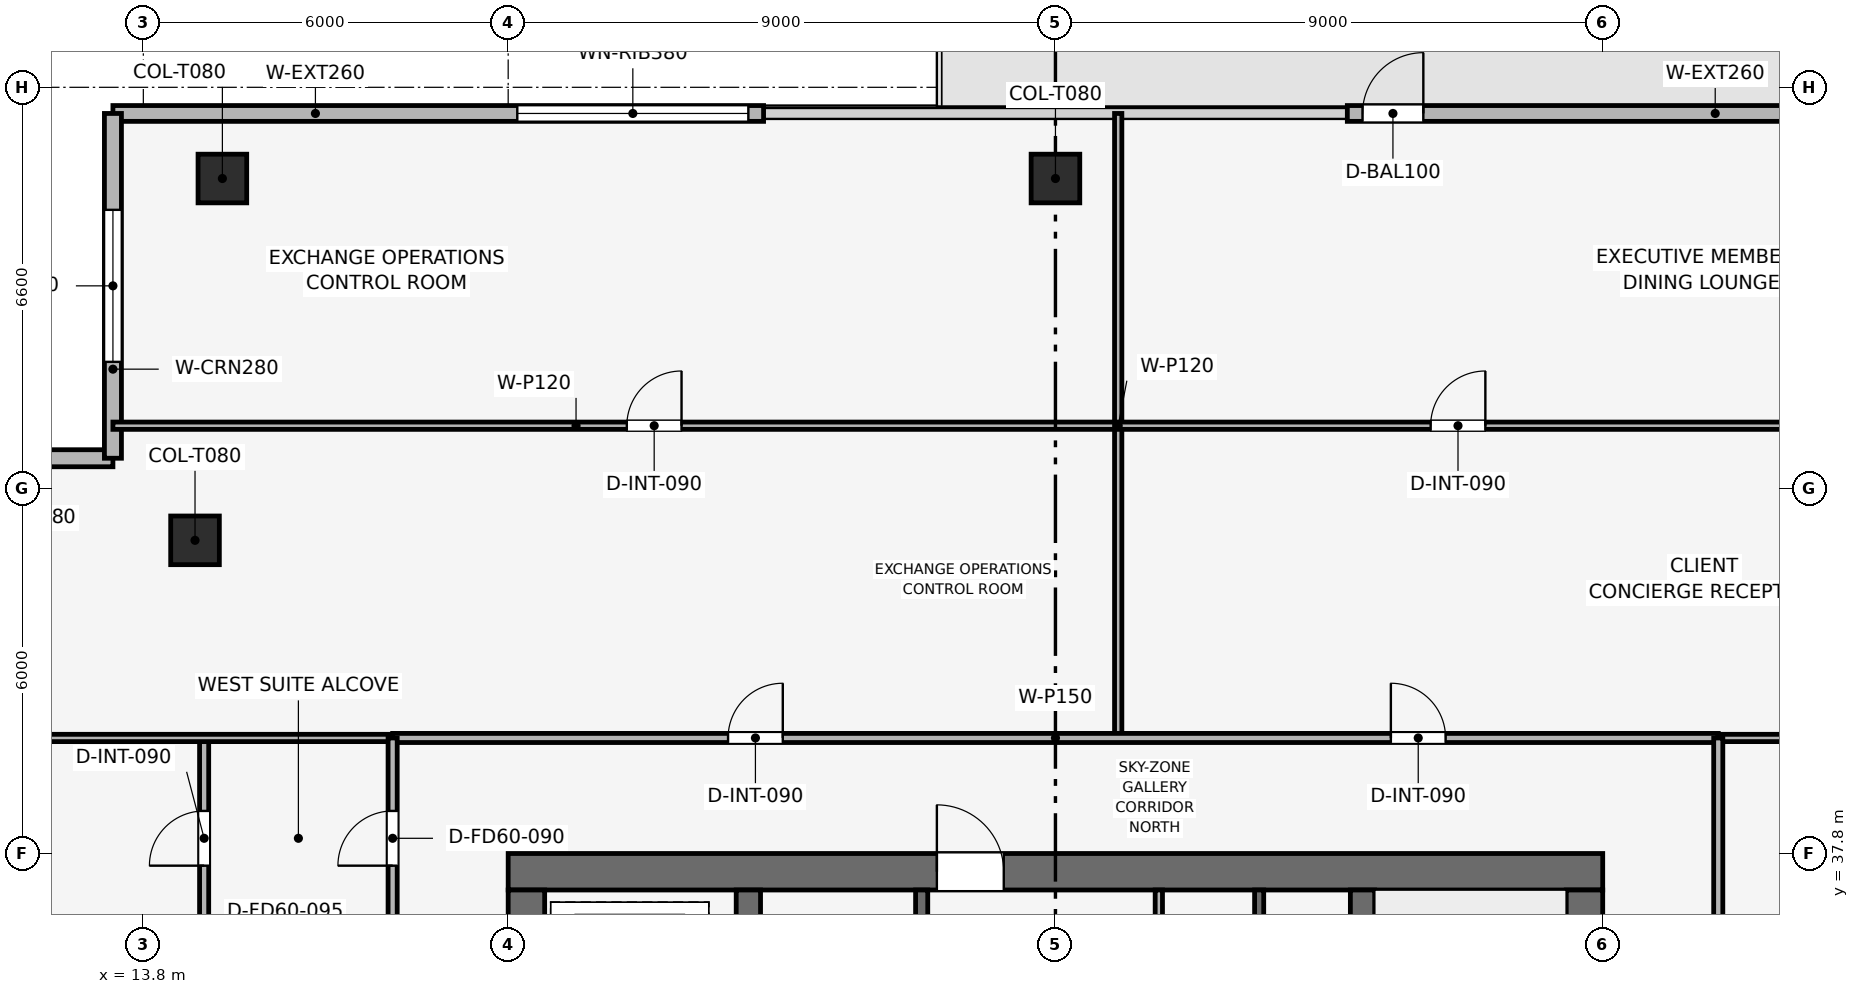
"""IFC4 building model, lengths in metres.
Left out: names, types, materials, properties, quantities, classifications, styles, units other than length and angle.
Written with IfcOpenShell. Run it as: python <this file> out.ifc"""

import sys

from ifc_helpers import new_model, si_unit, direction, frame, frame_2d, origin, origin_2d, place, context, subcontext, project, spatial, rectangle, extrude, element, fill, save


model = new_model("IFC4")
c1 = context("Model", 3, precision=1e-05, world=origin(), true_north=direction((0.0, 1.0)))
c2 = subcontext(c1, "Body", "Model", "MODEL_VIEW")
j1 = project(units=[si_unit("LENGTHUNIT", "METRE"), si_unit("PLANEANGLEUNIT", "RADIAN")], contexts=[c1])
p1 = place(None, origin())
s1 = spatial("IfcSite", under=j1, at=p1, CompositionType="ELEMENT")
p2 = place(p1, origin())
s2 = spatial("IfcBuilding", under=s1, at=p2, CompositionType="ELEMENT")
p3 = place(p2, frame((0.0, 0.0, 348.0)))
s3 = spatial("IfcBuildingStorey", under=s2, at=p3, CompositionType="ELEMENT", Elevation=348.0)
p4 = place(p3, frame((19.8, 37.5, 0.0), z_axis=(0.0, 0.0, 1.0), x_axis=(1.0, 0.0, 0.0)))
e1 = element("IfcWall", 1, at=p4, inside=s3, PredefinedType="SHEAR", context=c2, shape_type="SweptSolid", body=[
    extrude(rectangle(XDim=18.0, YDim=0.6, at=frame_2d((9.0, 0.0))), origin(), (0.0, 0.0, 1.0), 3.75),
])
p5 = place(p4, frame((7.05, 0.0, 0.0)))
e2 = element("IfcOpeningElement", 2, at=p5, cuts=e1, PredefinedType="OPENING", context=c2, shape_type="SweptSolid", body=[
    extrude(rectangle(XDim=1.1, YDim=2.15, at=frame_2d((0.55, 1.075))), frame((0.0, 0.31, 0.0), z_axis=(0.0, -1.0, 0.0), x_axis=(1.0, 0.0, 0.0)), (0.0, 0.0, 1.0), 0.62),
])
p6 = place(p3, frame((20.1, 20.4, 0.0), z_axis=(0.0, 0.0, 1.0), x_axis=(0.0, 1.0, 0.0)))
e3 = element("IfcWall", 3, at=p6, inside=s3, PredefinedType="SHEAR", context=c2, shape_type="SweptSolid", body=[
    extrude(rectangle(XDim=16.8, YDim=0.6, at=frame_2d((8.4, 0.0))), origin(), (0.0, 0.0, 1.0), 3.75),
])
p7 = place(p6, frame((10.4, 0.0, 0.0)))
e4 = element("IfcOpeningElement", 4, at=p7, cuts=e3, PredefinedType="OPENING", context=c2, shape_type="SweptSolid", body=[
    extrude(rectangle(XDim=1.1, YDim=2.15, at=frame_2d((0.55, 1.075))), frame((0.0, 0.31, 0.0), z_axis=(0.0, -1.0, 0.0), x_axis=(1.0, 0.0, 0.0)), (0.0, 0.0, 1.0), 0.62),
])
p8 = place(p3, frame((37.5, 20.4, 0.0), z_axis=(0.0, 0.0, 1.0), x_axis=(0.0, 1.0, 0.0)))
e5 = element("IfcWall", 5, at=p8, inside=s3, PredefinedType="SHEAR", context=c2, shape_type="SweptSolid", body=[
    extrude(rectangle(XDim=16.8, YDim=0.6, at=frame_2d((8.4, 0.0))), origin(), (0.0, 0.0, 1.0), 3.75),
])
p9 = place(p8, frame((4.9, 0.0, 0.0)))
e6 = element("IfcOpeningElement", 6, at=p9, cuts=e5, PredefinedType="OPENING", context=c2, shape_type="SweptSolid", body=[
    extrude(rectangle(XDim=1.1, YDim=2.15, at=frame_2d((0.55, 1.075))), frame((0.0, 0.31, 0.0), z_axis=(0.0, -1.0, 0.0), x_axis=(1.0, 0.0, 0.0)), (0.0, 0.0, 1.0), 0.62),
])
for number, where, z_axis, x_axis in (
    (7, (23.75, 20.4, 0.0), (0.0, 0.0, 1.0), (0.0, 1.0, 0.0)),
    (8, (33.85, 20.4, 0.0), (0.0, 0.0, 1.0), (0.0, 1.0, 0.0)),
):
    element("IfcWall", number, at=place(p3, frame(where, z_axis=z_axis, x_axis=x_axis)), inside=s3, PredefinedType="SHEAR", context=c2, shape_type="SweptSolid", body=[
        extrude(rectangle(XDim=16.8, YDim=0.4, at=frame_2d((8.4, 0.0))), origin(), (0.0, 0.0, 1.0), 3.75),
    ])
for number, where, z_axis, x_axis in (
    (9, (28.8, 48.9, 0.003), (0.0, 0.0, 1.0), (1.0, 0.0, 0.0)),
    (10, (15.1, 48.9, 0.003), (0.0, 0.0, 1.0), (1.0, 0.0, 0.0)),
    (11, (14.65, 42.95, 0.003), (0.0, 0.0, 1.0), (1.0, 0.0, 0.0)),
):
    element("IfcColumn", number, at=place(p3, frame(where, z_axis=z_axis, x_axis=x_axis)), inside=s3, PredefinedType="COLUMN", context=c2, shape_type="SweptSolid", body=[
        extrude(rectangle(XDim=0.8, YDim=0.8, at=origin_2d()), origin(), (0.0, 0.0, 1.0), 3.504),
    ])
p10 = place(p3, frame((13.3, 49.97, 0.0), z_axis=(0.0, 0.0, 1.0), x_axis=(1.0, 0.0, 0.0)))
e12 = element("IfcWall", 12, at=p10, inside=s3, PredefinedType="SOLIDWALL", context=c2, shape_type="SweptSolid", body=[
    extrude(rectangle(XDim=10.7, YDim=0.26, at=frame_2d((5.35, 0.0))), origin(), (0.0, 0.0, 1.0), 3.51),
])
p11 = place(p10, frame((6.65, 0.0, 0.9)))
e13 = element("IfcOpeningElement", 13, at=p11, cuts=e12, PredefinedType="OPENING", context=c2, shape_type="SweptSolid", body=[
    extrude(rectangle(XDim=3.8, YDim=1.9, at=frame_2d((1.9, 0.95))), frame((0.0, 0.14, 0.0), z_axis=(0.0, -1.0, 0.0), x_axis=(1.0, 0.0, 0.0)), (0.0, 0.0, 1.0), 0.28),
])
p12 = place(p3, frame((33.6, 49.97, 0.0), z_axis=(0.0, 0.0, 1.0), x_axis=(1.0, 0.0, 0.0)))
e14 = element("IfcWall", 14, at=p12, inside=s3, PredefinedType="SOLIDWALL", context=c2, shape_type="SweptSolid", body=[
    extrude(rectangle(XDim=10.7, YDim=0.26, at=frame_2d((5.35, 0.0))), origin(), (0.0, 0.0, 1.0), 3.51),
])
p13 = place(p12, frame((0.25, 0.0, 0.0)))
e15 = element("IfcOpeningElement", 15, at=p13, cuts=e14, PredefinedType="OPENING", context=c2, shape_type="SweptSolid", body=[
    extrude(rectangle(XDim=1.0, YDim=2.2, at=frame_2d((0.5, 1.1))), frame((0.0, 0.14, 0.0), z_axis=(0.0, -1.0, 0.0), x_axis=(1.0, 0.0, 0.0)), (0.0, 0.0, 1.0), 0.28),
])
p14 = place(p3, frame((7.63, 44.3, 0.0), z_axis=(0.0, 0.0, 1.0), x_axis=(1.0, 0.0, 0.0)))
e16 = element("IfcWall", 16, at=p14, inside=s3, PredefinedType="SOLIDWALL", context=c2, shape_type="SweptSolid", body=[
    extrude(rectangle(XDim=5.67, YDim=0.28, at=frame_2d((2.835, 0.0))), origin(), (0.0, 0.0, 1.0), 3.51),
])
p15 = place(p14, frame((1.585, 0.0, 0.9)))
e17 = element("IfcOpeningElement", 17, at=p15, cuts=e16, PredefinedType="OPENING", context=c2, shape_type="SweptSolid", body=[
    extrude(rectangle(XDim=2.5, YDim=1.9, at=frame_2d((1.25, 0.95))), frame((0.0, 0.15, 0.0), z_axis=(0.0, -1.0, 0.0), x_axis=(1.0, 0.0, 0.0)), (0.0, 0.0, 1.0), 0.3),
])
p16 = place(p3, frame((13.3, 44.3, 0.0), z_axis=(0.0, 0.0, 1.0), x_axis=(0.0, 1.0, 0.0)))
e18 = element("IfcWall", 18, at=p16, inside=s3, PredefinedType="SOLIDWALL", context=c2, shape_type="SweptSolid", body=[
    extrude(rectangle(XDim=5.67, YDim=0.28, at=frame_2d((2.835, 0.0))), origin(), (0.0, 0.0, 1.0), 3.51),
])
p17 = place(p16, frame((1.585, 0.0, 0.9)))
e19 = element("IfcOpeningElement", 19, at=p17, cuts=e18, PredefinedType="OPENING", context=c2, shape_type="SweptSolid", body=[
    extrude(rectangle(XDim=2.5, YDim=1.9, at=frame_2d((1.25, 0.95))), frame((0.0, 0.15, 0.0), z_axis=(0.0, -1.0, 0.0), x_axis=(1.0, 0.0, 0.0)), (0.0, 0.0, 1.0), 0.3),
])
p18 = place(p3, frame((32.15, 34.0, 0.0), z_axis=(0.0, 0.0, 1.0), x_axis=(0.0, 1.0, 0.0)))
e20 = element("IfcWall", 20, at=p18, inside=s3, PredefinedType="SHEAR", context=c2, shape_type="SweptSolid", body=[
    extrude(rectangle(XDim=3.2, YDim=0.15, at=frame_2d((1.6, 0.0))), origin(), (0.0, 0.0, 1.0), 3.51),
])
p19 = place(p3, frame((26.6, 34.0, 0.0), z_axis=(0.0, 0.0, 1.0), x_axis=(0.0, 1.0, 0.0)))
e21 = element("IfcWall", 21, at=p19, inside=s3, PredefinedType="SHEAR", context=c2, shape_type="SweptSolid", body=[
    extrude(rectangle(XDim=3.2, YDim=0.2, at=frame_2d((1.6, 0.0))), origin(), (0.0, 0.0, 1.0), 3.51),
])
p20 = place(p19, frame((0.75, 0.0, 0.0)))
e22 = element("IfcOpeningElement", 22, at=p20, cuts=e21, PredefinedType="OPENING", context=c2, shape_type="SweptSolid", body=[
    extrude(rectangle(XDim=1.1, YDim=2.15, at=frame_2d((0.55, 1.075))), frame((0.0, 0.11, 0.0), z_axis=(0.0, -1.0, 0.0), x_axis=(1.0, 0.0, 0.0)), (0.0, 0.0, 1.0), 0.22),
])
p21 = place(p3, frame((30.5, 33.925, 0.0), z_axis=(0.0, 0.0, 1.0), x_axis=(0.0, 1.0, 0.0)))
e23 = element("IfcWall", 23, at=p21, inside=s3, PredefinedType="PARTITIONING", context=c2, shape_type="SweptSolid", body=[
    extrude(rectangle(XDim=3.275, YDim=0.12, at=frame_2d((1.637, 0.0))), origin(), (0.0, 0.0, 1.0), 3.51),
])
p22 = place(p21, frame((0.85, 0.0, 0.0)))
e24 = element("IfcOpeningElement", 24, at=p22, cuts=e23, PredefinedType="OPENING", context=c2, shape_type="SweptSolid", body=[
    extrude(rectangle(XDim=0.9, YDim=2.1, at=frame_2d((0.45, 1.05))), frame((0.0, 0.07, 0.0), z_axis=(0.0, -1.0, 0.0), x_axis=(1.0, 0.0, 0.0)), (0.0, 0.0, 1.0), 0.14),
])
p23 = place(p3, frame((13.3, 44.835, 0.0), z_axis=(0.0, 0.0, 1.0), x_axis=(1.0, 0.0, 0.0)))
e25 = element("IfcWall", 25, at=p23, inside=s3, PredefinedType="PARTITIONING", context=c2, shape_type="SweptSolid", body=[
    extrude(rectangle(XDim=16.532, YDim=0.12, at=frame_2d((8.266, 0.0))), origin(), (0.0, 0.0, 1.0), 3.095),
])
p24 = place(p23, frame((8.451, 0.0, 0.0)))
e26 = element("IfcOpeningElement", 26, at=p24, cuts=e25, PredefinedType="OPENING", context=c2, shape_type="SweptSolid", body=[
    extrude(rectangle(XDim=0.9, YDim=2.1, at=frame_2d((0.45, 1.05))), frame((0.0, 0.07, 0.0), z_axis=(0.0, -1.0, 0.0), x_axis=(1.0, 0.0, 0.0)), (0.0, 0.0, 1.0), 0.14),
])
p25 = place(p3, frame((29.832, 39.7, 0.0), z_axis=(0.0, 0.0, 1.0), x_axis=(0.0, 1.0, 0.0)))
e27 = element("IfcWall", 27, at=p25, inside=s3, PredefinedType="PARTITIONING", context=c2, shape_type="SweptSolid", body=[
    extrude(rectangle(XDim=10.27, YDim=0.12, at=frame_2d((5.135, 0.0))), origin(), (0.0, 0.0, 1.0), 3.135),
])
p26 = place(p3, frame((29.832, 44.835, 0.0), z_axis=(0.0, 0.0, 1.0), x_axis=(1.0, 0.0, 0.0)))
e28 = element("IfcWall", 28, at=p26, inside=s3, PredefinedType="PARTITIONING", context=c2, shape_type="SweptSolid", body=[
    extrude(rectangle(XDim=14.468, YDim=0.12, at=frame_2d((7.234, 0.0))), origin(), (0.0, 0.0, 1.0), 3.095),
])
p27 = place(p26, frame((5.138, 0.0, 0.0)))
e29 = element("IfcOpeningElement", 29, at=p27, cuts=e28, PredefinedType="OPENING", context=c2, shape_type="SweptSolid", body=[
    extrude(rectangle(XDim=0.9, YDim=2.1, at=frame_2d((0.45, 1.05))), frame((0.0, 0.07, 0.0), z_axis=(0.0, -1.0, 0.0), x_axis=(1.0, 0.0, 0.0)), (0.0, 0.0, 1.0), 0.14),
])
p28 = place(p3, frame((14.8, 28.0, 0.0), z_axis=(0.0, 0.0, 1.0), x_axis=(0.0, 1.0, 0.0)))
e30 = element("IfcWall", 30, at=p28, inside=s3, PredefinedType="PARTITIONING", context=c2, shape_type="SweptSolid", body=[
    extrude(rectangle(XDim=11.7, YDim=0.15, at=frame_2d((5.85, 0.0))), origin(), (0.0, 0.0, 1.0), 3.095),
])
p29 = place(p28, frame((9.6, 0.0, 0.0)))
e31 = element("IfcOpeningElement", 31, at=p29, cuts=e30, PredefinedType="OPENING", context=c2, shape_type="SweptSolid", body=[
    extrude(rectangle(XDim=0.9, YDim=2.1, at=frame_2d((0.45, 1.05))), frame((0.0, 0.085, 0.0), z_axis=(0.0, -1.0, 0.0), x_axis=(1.0, 0.0, 0.0)), (0.0, 0.0, 1.0), 0.17),
])
for number, where, z_axis, x_axis in (
    (32, (7.63, 39.7, 0.0), (0.0, 0.0, 1.0), (1.0, 0.0, 0.0)),
    (33, (39.7, 39.7, 0.0), (0.0, 0.0, 1.0), (1.0, 0.0, 0.0)),
):
    element("IfcWall", number, at=place(p3, frame(where, z_axis=z_axis, x_axis=x_axis)), inside=s3, PredefinedType="PARTITIONING", context=c2, shape_type="SweptSolid", body=[
        extrude(rectangle(XDim=10.27, YDim=0.12, at=frame_2d((5.135, 0.0))), origin(), (0.0, 0.0, 1.0), 3.095),
    ])
p30 = place(p3, frame((17.9, 39.7, 0.0), z_axis=(0.0, 0.0, 1.0), x_axis=(1.0, 0.0, 0.0)))
e34 = element("IfcWall", 34, at=p30, inside=s3, PredefinedType="PARTITIONING", context=c2, shape_type="SweptSolid", body=[
    extrude(rectangle(XDim=21.8, YDim=0.15, at=frame_2d((10.9, 0.0))), origin(), (0.0, 0.0, 1.0), 3.095),
])
p31 = place(p30, frame((5.516, 0.0, 0.0)))
e35 = element("IfcOpeningElement", 35, at=p31, cuts=e34, PredefinedType="OPENING", context=c2, shape_type="SweptSolid", body=[
    extrude(rectangle(XDim=0.9, YDim=2.1, at=frame_2d((0.45, 1.05))), frame((0.0, 0.085, 0.0), z_axis=(0.0, -1.0, 0.0), x_axis=(1.0, 0.0, 0.0)), (0.0, 0.0, 1.0), 0.17),
])
p32 = place(p30, frame((16.416, 0.0, 0.0)))
e36 = element("IfcOpeningElement", 36, at=p32, cuts=e34, PredefinedType="OPENING", context=c2, shape_type="SweptSolid", body=[
    extrude(rectangle(XDim=0.9, YDim=2.1, at=frame_2d((0.45, 1.05))), frame((0.0, 0.085, 0.0), z_axis=(0.0, -1.0, 0.0), x_axis=(1.0, 0.0, 0.0)), (0.0, 0.0, 1.0), 0.17),
])
p33 = place(p3, frame((17.9, 13.3, 0.0), z_axis=(0.0, 0.0, 1.0), x_axis=(0.0, 1.0, 0.0)))
e37 = element("IfcWall", 37, at=p33, inside=s3, PredefinedType="PARTITIONING", context=c2, shape_type="SweptSolid", body=[
    extrude(rectangle(XDim=26.4, YDim=0.15, at=frame_2d((13.2, 0.0))), origin(), (0.0, 0.0, 1.0), 3.095),
])
p34 = place(p33, frame((6.9, 0.0, 0.0)))
e38 = element("IfcOpeningElement", 38, at=p34, cuts=e37, PredefinedType="OPENING", context=c2, shape_type="SweptSolid", body=[
    extrude(rectangle(XDim=0.9, YDim=2.1, at=frame_2d((0.45, 1.05))), frame((0.0, 0.085, 0.0), z_axis=(0.0, -1.0, 0.0), x_axis=(1.0, 0.0, 0.0)), (0.0, 0.0, 1.0), 0.17),
])
p35 = place(p33, frame((15.65, 0.0, 0.0)))
e39 = element("IfcOpeningElement", 39, at=p35, cuts=e37, PredefinedType="OPENING", context=c2, shape_type="SweptSolid", body=[
    extrude(rectangle(XDim=0.9, YDim=2.1, at=frame_2d((0.45, 1.05))), frame((0.0, 0.085, 0.0), z_axis=(0.0, -1.0, 0.0), x_axis=(1.0, 0.0, 0.0)), (0.0, 0.0, 1.0), 0.17),
])
p36 = place(p33, frame((18.55, 0.0, 0.0)))
e40 = element("IfcOpeningElement", 40, at=p36, cuts=e37, PredefinedType="OPENING", context=c2, shape_type="SweptSolid", body=[
    extrude(rectangle(XDim=0.9, YDim=2.1, at=frame_2d((0.45, 1.05))), frame((0.0, 0.085, 0.0), z_axis=(0.0, -1.0, 0.0), x_axis=(1.0, 0.0, 0.0)), (0.0, 0.0, 1.0), 0.17),
])
p37 = place(p33, frame((21.3, 0.0, 0.0)))
e41 = element("IfcOpeningElement", 41, at=p37, cuts=e37, PredefinedType="OPENING", context=c2, shape_type="SweptSolid", body=[
    extrude(rectangle(XDim=0.95, YDim=2.1, at=frame_2d((0.475, 1.05))), frame((0.0, 0.085, 0.0), z_axis=(0.0, -1.0, 0.0), x_axis=(1.0, 0.0, 0.0)), (0.0, 0.0, 1.0), 0.17),
])
p38 = place(p33, frame((24.3, 0.0, 0.0)))
e42 = element("IfcOpeningElement", 42, at=p38, cuts=e37, PredefinedType="OPENING", context=c2, shape_type="SweptSolid", body=[
    extrude(rectangle(XDim=0.9, YDim=2.1, at=frame_2d((0.45, 1.05))), frame((0.0, 0.085, 0.0), z_axis=(0.0, -1.0, 0.0), x_axis=(1.0, 0.0, 0.0)), (0.0, 0.0, 1.0), 0.17),
])
p39 = place(p3, frame((39.7, 24.4, 0.0), z_axis=(0.0, 0.0, 1.0), x_axis=(0.0, 1.0, 0.0)))
e43 = element("IfcWall", 43, at=p39, inside=s3, PredefinedType="PARTITIONING", context=c2, shape_type="SweptSolid", body=[
    extrude(rectangle(XDim=15.3, YDim=0.15, at=frame_2d((7.65, 0.0))), origin(), (0.0, 0.0, 1.0), 3.095),
])
p40 = place(p39, frame((0.7, 0.0, 0.0)))
e44 = element("IfcOpeningElement", 44, at=p40, cuts=e43, PredefinedType="OPENING", context=c2, shape_type="SweptSolid", body=[
    extrude(rectangle(XDim=0.9, YDim=2.1, at=frame_2d((0.45, 1.05))), frame((0.0, 0.085, 0.0), z_axis=(0.0, -1.0, 0.0), x_axis=(1.0, 0.0, 0.0)), (0.0, 0.0, 1.0), 0.17),
])
p41 = place(p39, frame((3.966, 0.0, 0.0)))
e45 = element("IfcOpeningElement", 45, at=p41, cuts=e43, PredefinedType="OPENING", context=c2, shape_type="SweptSolid", body=[
    extrude(rectangle(XDim=0.9, YDim=2.1, at=frame_2d((0.45, 1.05))), frame((0.0, 0.085, 0.0), z_axis=(0.0, -1.0, 0.0), x_axis=(1.0, 0.0, 0.0)), (0.0, 0.0, 1.0), 0.17),
])
p42 = place(p39, frame((10.465, 0.0, 0.0)))
e46 = element("IfcOpeningElement", 46, at=p42, cuts=e43, PredefinedType="OPENING", context=c2, shape_type="SweptSolid", body=[
    extrude(rectangle(XDim=0.9, YDim=2.1, at=frame_2d((0.45, 1.05))), frame((0.0, 0.085, 0.0), z_axis=(0.0, -1.0, 0.0), x_axis=(1.0, 0.0, 0.0)), (0.0, 0.0, 1.0), 0.17),
])
p43 = place(p13, origin())
e47 = element("IfcDoor", 47, at=p43, inside=s3, OperationType="SINGLE_SWING_RIGHT", PredefinedType="DOOR", context=c2, shape_type="SweptSolid", body=[
    extrude(rectangle(XDim=1.0, YDim=2.2, at=frame_2d((0.5, 1.1))), frame((0.0, 0.025, 0.0), z_axis=(0.0, -1.0, 0.0), x_axis=(1.0, 0.0, 0.0)), (0.0, 0.0, 1.0), 0.05),
])
fill(e15, e47)
p44 = place(p11, origin())
e48 = element("IfcWindow", 48, at=p44, inside=s3, PartitioningType="SINGLE_PANEL", PredefinedType="WINDOW", context=c2, shape_type="SweptSolid", body=[
    extrude(rectangle(XDim=3.8, YDim=1.9, at=frame_2d((1.9, 0.95))), frame((0.0, 0.03, 0.0), z_axis=(0.0, -1.0, 0.0), x_axis=(1.0, 0.0, 0.0)), (0.0, 0.0, 1.0), 0.06),
])
fill(e13, e48)
p45 = place(p17, origin())
e49 = element("IfcWindow", 49, at=p45, inside=s3, PartitioningType="SINGLE_PANEL", PredefinedType="WINDOW", context=c2, shape_type="SweptSolid", body=[
    extrude(rectangle(XDim=2.5, YDim=1.9, at=frame_2d((1.25, 0.95))), frame((0.0, 0.03, 0.0), z_axis=(0.0, -1.0, 0.0), x_axis=(1.0, 0.0, 0.0)), (0.0, 0.0, 1.0), 0.06),
])
fill(e19, e49)
p46 = place(p24, origin())
e50 = element("IfcDoor", 50, at=p46, inside=s3, OperationType="SINGLE_SWING_RIGHT", PredefinedType="DOOR", context=c2, shape_type="SweptSolid", body=[
    extrude(rectangle(XDim=0.9, YDim=2.1, at=frame_2d((0.45, 1.05))), frame((0.0, 0.025, 0.0), z_axis=(0.0, -1.0, 0.0), x_axis=(1.0, 0.0, 0.0)), (0.0, 0.0, 1.0), 0.05),
])
fill(e26, e50)
p47 = place(p27, origin())
e51 = element("IfcDoor", 51, at=p47, inside=s3, OperationType="SINGLE_SWING_RIGHT", PredefinedType="DOOR", context=c2, shape_type="SweptSolid", body=[
    extrude(rectangle(XDim=0.9, YDim=2.1, at=frame_2d((0.45, 1.05))), frame((0.0, 0.025, 0.0), z_axis=(0.0, -1.0, 0.0), x_axis=(1.0, 0.0, 0.0)), (0.0, 0.0, 1.0), 0.05),
])
fill(e29, e51)
p48 = place(p29, origin())
e52 = element("IfcDoor", 52, at=p48, inside=s3, OperationType="SINGLE_SWING_LEFT", PredefinedType="DOOR", context=c2, shape_type="SweptSolid", body=[
    extrude(rectangle(XDim=0.9, YDim=2.1, at=frame_2d((0.45, 1.05))), frame((0.0, 0.025, 0.0), z_axis=(0.0, -1.0, 0.0), x_axis=(1.0, 0.0, 0.0)), (0.0, 0.0, 1.0), 0.05),
])
fill(e31, e52)
p49 = place(p31, origin())
e53 = element("IfcDoor", 53, at=p49, inside=s3, OperationType="SINGLE_SWING_RIGHT", PredefinedType="DOOR", context=c2, shape_type="SweptSolid", body=[
    extrude(rectangle(XDim=0.9, YDim=2.1, at=frame_2d((0.45, 1.05))), frame((0.0, 0.025, 0.0), z_axis=(0.0, -1.0, 0.0), x_axis=(1.0, 0.0, 0.0)), (0.0, 0.0, 1.0), 0.05),
])
fill(e35, e53)
p50 = place(p32, origin())
e54 = element("IfcDoor", 54, at=p50, inside=s3, OperationType="SINGLE_SWING_LEFT", PredefinedType="DOOR", context=c2, shape_type="SweptSolid", body=[
    extrude(rectangle(XDim=0.9, YDim=2.1, at=frame_2d((0.45, 1.05))), frame((0.0, 0.025, 0.0), z_axis=(0.0, -1.0, 0.0), x_axis=(1.0, 0.0, 0.0)), (0.0, 0.0, 1.0), 0.05),
])
fill(e36, e54)
p51 = place(p38, origin())
e55 = element("IfcDoor", 55, at=p51, inside=s3, OperationType="SINGLE_SWING_LEFT", PredefinedType="DOOR", context=c2, shape_type="SweptSolid", body=[
    extrude(rectangle(XDim=0.9, YDim=2.1, at=frame_2d((0.45, 1.05))), frame((0.0, 0.025, 0.0), z_axis=(0.0, -1.0, 0.0), x_axis=(1.0, 0.0, 0.0)), (0.0, 0.0, 1.0), 0.05),
])
fill(e42, e55)
p52 = place(p5, origin())
e56 = element("IfcDoor", 56, at=p52, inside=s3, OperationType="SINGLE_SWING_LEFT", PredefinedType="DOOR", context=c2, shape_type="SweptSolid", body=[
    extrude(rectangle(XDim=1.1, YDim=2.15, at=frame_2d((0.55, 1.075))), frame((0.0, 0.025, 0.0), z_axis=(0.0, -1.0, 0.0), x_axis=(1.0, 0.0, 0.0)), (0.0, 0.0, 1.0), 0.05),
])
fill(e2, e56)
save(model, sys.argv[1])
